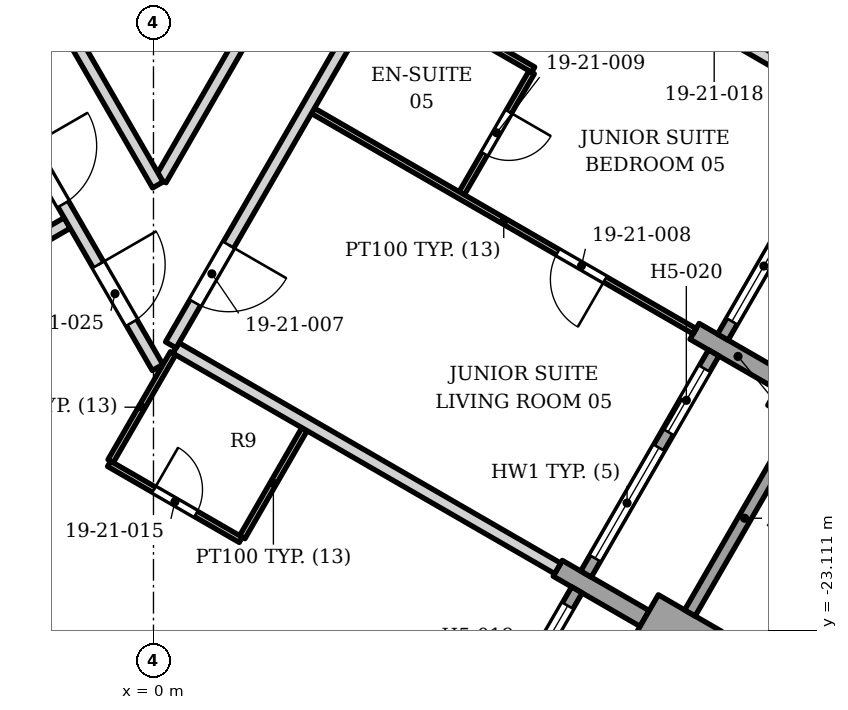
"""IFC4 building model, lengths in metres.
Left out: names, types, materials, properties, quantities, classifications, styles, units other than length and angle.
Written with IfcOpenShell. Run it as: python <this file> out.ifc"""

import sys

from ifc_helpers import new_model, si_unit, direction, frame, frame_2d, origin, origin_2d, place, context, subcontext, project, spatial, rectangle, extrude, element, fill, save


model = new_model("IFC4")
c1 = context("Model", 3, precision=1e-05, world=origin(), true_north=direction((0.0, 1.0)))
c2 = subcontext(c1, "Body", "Model", "MODEL_VIEW")
j1 = project(units=[si_unit("LENGTHUNIT", "METRE"), si_unit("PLANEANGLEUNIT", "RADIAN")], contexts=[c1])
p1 = place(None, origin())
s1 = spatial("IfcSite", under=j1, at=p1, CompositionType="ELEMENT")
p2 = place(p1, origin())
s2 = spatial("IfcBuilding", under=s1, at=p2, CompositionType="ELEMENT")
p3 = place(p2, frame((0.0, 0.0, 91.8)))
s3 = spatial("IfcBuildingStorey", under=s2, at=p3, CompositionType="ELEMENT", Elevation=91.8)
p4 = place(p3, frame((10.847, -19.317, 0.0), z_axis=(0.0, 0.0, 1.0), x_axis=(0.5, 0.866025403784, 0.0)))
e1 = element("IfcColumn", 1, at=p4, inside=s3, PredefinedType="COLUMN", context=c2, shape_type="SweptSolid", body=[
    extrude(rectangle(XDim=0.9, YDim=1.2, at=origin_2d()), origin(), (0.0, 0.0, 1.0), 3.4),
])
p5 = place(p3, frame((9.117, -23.514, 0.0), z_axis=(0.0, 0.0, 1.0), x_axis=(-0.866006032174, 0.500033551112, 0.0)))
e2 = element("IfcWall", 2, at=p5, inside=s3, PredefinedType="SOLIDWALL", context=c2, shape_type="SweptSolid", body=[
    extrude(rectangle(XDim=1.2, YDim=0.9, at=frame_2d((0.6, 0.0))), origin(), (0.0, 0.0, 1.0), 2.63),
])
p6 = place(p3, frame((8.078, -22.914, 0.0), z_axis=(0.0, 0.0, 1.0), x_axis=(-0.866040211805, 0.499974350878, 0.0)))
e3 = element("IfcWall", 3, at=p6, inside=s3, PredefinedType="SOLIDWALL", context=c2, shape_type="SweptSolid", body=[
    extrude(rectangle(XDim=1.65, YDim=0.3, at=frame_2d((0.825, 0.0))), origin(), (0.0, 0.0, 1.0), 2.65),
])
p7 = place(p3, frame((8.899, -18.192, 0.0), z_axis=(0.0, 0.0, 1.0), x_axis=(0.866067297121, -0.499927431592, 0.0)))
e4 = element("IfcWall", 4, at=p7, inside=s3, PredefinedType="SOLIDWALL", context=c2, shape_type="SweptSolid", body=[
    extrude(rectangle(XDim=1.65, YDim=0.3, at=frame_2d((0.825, 0.0))), origin(), (0.0, 0.0, 1.0), 2.65),
])
p8 = place(p3, frame((4.864, -26.081, 0.0), z_axis=(0.0, 0.0, 1.0), x_axis=(0.500027713859, 0.866009402589, 0.0)))
e5 = element("IfcWall", 5, at=p8, inside=s3, PredefinedType="ELEMENTEDWALL", context=c2, shape_type="SweptSolid", body=[
    extrude(rectangle(XDim=4.2, YDim=0.2, at=frame_2d((2.1, 0.0))), origin(), (0.0, 0.0, 1.0), 2.45),
])
p9 = place(p8, frame((0.3, 0.0, 0.6)))
e6 = element("IfcOpeningElement", 6, at=p9, cuts=e5, PredefinedType="OPENING", context=c2, shape_type="SweptSolid", body=[
    extrude(rectangle(XDim=2.1, YDim=1.75, at=frame_2d((1.05, 0.875))), frame((0.0, 0.11, 0.0), z_axis=(0.0, -1.0, 0.0), x_axis=(1.0, 0.0, 0.0)), (0.0, 0.0, 1.0), 0.22),
])
p10 = place(p8, frame((2.7, 0.0, 0.0)))
e7 = element("IfcOpeningElement", 7, at=p10, cuts=e5, PredefinedType="OPENING", context=c2, shape_type="SweptSolid", body=[
    extrude(rectangle(XDim=1.2, YDim=2.35, at=frame_2d((0.6, 1.175))), frame((0.0, 0.11, 0.0), z_axis=(0.0, -1.0, 0.0), x_axis=(1.0, 0.0, 0.0)), (0.0, 0.0, 1.0), 0.22),
])
p11 = place(p3, frame((8.823, -22.824, 0.0), z_axis=(0.0, 0.0, 1.0), x_axis=(0.500012057535, 0.866018442252, 0.0)))
e8 = element("IfcWall", 8, at=p11, inside=s3, PredefinedType="SOLIDWALL", context=c2, shape_type="SweptSolid", body=[
    extrude(rectangle(XDim=3.6, YDim=0.2, at=frame_2d((1.8, 0.0))), origin(), (0.0, 0.0, 1.0), 2.63),
])
p12 = place(p3, frame((7.114, -22.184, 0.0), z_axis=(0.0, 0.0, 1.0), x_axis=(0.500002543286, 0.866023935413, 0.0)))
e9 = element("IfcWall", 9, at=p12, inside=s3, PredefinedType="ELEMENTEDWALL", context=c2, shape_type="SweptSolid", body=[
    extrude(rectangle(XDim=4.2, YDim=0.2, at=frame_2d((2.1, 0.0))), origin(), (0.0, 0.0, 1.0), 2.65),
])
p13 = place(p12, frame((0.3, 0.0, 0.6)))
e10 = element("IfcOpeningElement", 10, at=p13, cuts=e9, PredefinedType="OPENING", context=c2, shape_type="SweptSolid", body=[
    extrude(rectangle(XDim=2.1, YDim=1.8, at=frame_2d((1.05, 0.9))), frame((0.0, 0.11, 0.0), z_axis=(0.0, -1.0, 0.0), x_axis=(1.0, 0.0, 0.0)), (0.0, 0.0, 1.0), 0.22),
])
p14 = place(p12, frame((2.7, 0.0, 0.0)))
e11 = element("IfcOpeningElement", 11, at=p14, cuts=e9, PredefinedType="OPENING", context=c2, shape_type="SweptSolid", body=[
    extrude(rectangle(XDim=1.2, YDim=2.4, at=frame_2d((0.6, 1.2))), frame((0.0, 0.11, 0.0), z_axis=(0.0, -1.0, 0.0), x_axis=(1.0, 0.0, 0.0)), (0.0, 0.0, 1.0), 0.22),
])
p15 = place(p3, frame((9.364, -18.287, 0.0), z_axis=(0.0, 0.0, 1.0), x_axis=(0.500027713859, 0.866009402589, 0.0)))
e12 = element("IfcWall", 12, at=p15, inside=s3, PredefinedType="ELEMENTEDWALL", context=c2, shape_type="SweptSolid", body=[
    extrude(rectangle(XDim=4.2, YDim=0.2, at=frame_2d((2.1, 0.0))), origin(), (0.0, 0.0, 1.0), 2.65),
])
p16 = place(p15, frame((0.3, 0.0, 0.6)))
e13 = element("IfcOpeningElement", 13, at=p16, cuts=e12, PredefinedType="OPENING", context=c2, shape_type="SweptSolid", body=[
    extrude(rectangle(XDim=2.1, YDim=1.8, at=frame_2d((1.05, 0.9))), frame((0.0, 0.11, 0.0), z_axis=(0.0, -1.0, 0.0), x_axis=(1.0, 0.0, 0.0)), (0.0, 0.0, 1.0), 0.22),
])
p17 = place(p15, frame((2.7, 0.0, 0.0)))
e14 = element("IfcOpeningElement", 14, at=p17, cuts=e12, PredefinedType="OPENING", context=c2, shape_type="SweptSolid", body=[
    extrude(rectangle(XDim=1.2, YDim=2.4, at=frame_2d((0.6, 1.2))), frame((0.0, 0.11, 0.0), z_axis=(0.0, -1.0, 0.0), x_axis=(1.0, 0.0, 0.0)), (0.0, 0.0, 1.0), 0.22),
])
p18 = place(p3, frame((1.46, -21.576, 0.0), z_axis=(0.0, 0.0, 1.0), x_axis=(0.499354689006, 0.866397653833, 0.0)))
e15 = element("IfcWall", 15, at=p18, inside=s3, PredefinedType="PARTITIONING", context=c2, shape_type="SweptSolid", body=[
    extrude(rectangle(XDim=2.05, YDim=0.1, at=frame_2d((1.025, 0.0))), origin(), (0.0, 0.0, 1.0), 3.23),
])
p19 = place(p3, frame((-0.729, -20.37, 0.0), z_axis=(0.0, 0.0, 1.0), x_axis=(0.866022959057, -0.500004234368, 0.0)))
e16 = element("IfcWall", 16, at=p19, inside=s3, PredefinedType="PARTITIONING", context=c2, shape_type="SweptSolid", body=[
    extrude(rectangle(XDim=2.5, YDim=0.1, at=frame_2d((1.25, 0.0))), origin(), (0.0, 0.0, 1.0), 2.552),
])
p20 = place(p19, frame((0.85, 0.0, 0.0)))
e17 = element("IfcOpeningElement", 17, at=p20, cuts=e16, PredefinedType="OPENING", context=c2, shape_type="SweptSolid", body=[
    extrude(rectangle(XDim=0.8, YDim=2.1, at=frame_2d((0.4, 1.05))), frame((0.0, 0.06, 0.0), z_axis=(0.0, -1.0, 0.0), x_axis=(1.0, 0.0, 0.0)), (0.0, 0.0, 1.0), 0.12),
])
p21 = place(p3, frame((-5.792, -18.933, 0.0), z_axis=(0.0, 0.0, 1.0), x_axis=(0.866155802953, 0.499774073968, 0.0)))
e18 = element("IfcWall", 18, at=p21, inside=s3, PredefinedType="PARTITIONING", context=c2, shape_type="SweptSolid", body=[
    extrude(rectangle(XDim=5.05, YDim=0.2, at=frame_2d((2.525, 0.0))), origin(), (0.0, 0.0, 1.0), 2.628),
])
p22 = place(p3, frame((-10.334, -0.77, 0.0), z_axis=(0.0, 0.0, 1.0), x_axis=(0.499996405163, -0.866027479255, 0.0)))
e19 = element("IfcWall", 19, at=p22, inside=s3, PredefinedType="PARTITIONING", context=c2, shape_type="SweptSolid", body=[
    extrude(rectangle(XDim=20.803, YDim=0.2, at=frame_2d((10.401, 0.0))), origin(), (0.0, 0.0, 1.0), 2.384),
])
p23 = place(p22, frame((4.0, 0.0, 0.0)))
e20 = element("IfcOpeningElement", 20, at=p23, cuts=e19, PredefinedType="OPENING", context=c2, shape_type="SweptSolid", body=[
    extrude(rectangle(XDim=1.0, YDim=2.1, at=frame_2d((0.5, 1.05))), frame((0.0, 0.11, 0.0), z_axis=(0.0, -1.0, 0.0), x_axis=(1.0, 0.0, 0.0)), (0.0, 0.0, 1.0), 0.22),
])
p24 = place(p22, frame((9.7, 0.0, 0.0)))
e21 = element("IfcOpeningElement", 21, at=p24, cuts=e19, PredefinedType="OPENING", context=c2, shape_type="SweptSolid", body=[
    extrude(rectangle(XDim=1.0, YDim=2.1, at=frame_2d((0.5, 1.05))), frame((0.0, 0.11, 0.0), z_axis=(0.0, -1.0, 0.0), x_axis=(1.0, 0.0, 0.0)), (0.0, 0.0, 1.0), 0.22),
])
p25 = place(p22, frame((16.6, 0.0, 0.0)))
e22 = element("IfcOpeningElement", 22, at=p25, cuts=e19, PredefinedType="OPENING", context=c2, shape_type="SweptSolid", body=[
    extrude(rectangle(XDim=1.1, YDim=2.1, at=frame_2d((0.55, 1.05))), frame((0.0, 0.11, 0.0), z_axis=(0.0, -1.0, 0.0), x_axis=(1.0, 0.0, 0.0)), (0.0, 0.0, 1.0), 0.22),
])
p26 = place(p22, frame((18.852, 0.0, 0.0)))
e23 = element("IfcOpeningElement", 23, at=p26, cuts=e19, PredefinedType="OPENING", context=c2, shape_type="SweptSolid", body=[
    extrude(rectangle(XDim=1.1, YDim=2.1, at=frame_2d((0.55, 1.05))), frame((0.0, 0.11, 0.0), z_axis=(0.0, -1.0, 0.0), x_axis=(1.0, 0.0, 0.0)), (0.0, 0.0, 1.0), 0.22),
])
p27 = place(p3, frame((-0.705, -20.326, 0.0), z_axis=(0.0, 0.0, 1.0), x_axis=(0.500698204548, 0.865621919756, 0.0)))
e24 = element("IfcWall", 24, at=p27, inside=s3, PredefinedType="PARTITIONING", context=c2, shape_type="SweptSolid", body=[
    extrude(rectangle(XDim=2.05, YDim=0.1, at=frame_2d((1.025, 0.0))), origin(), (0.0, 0.0, 1.0), 2.552),
])
p28 = place(p3, frame((0.37, -18.466, 0.0), z_axis=(0.0, 0.0, 1.0), x_axis=(0.866027438349, -0.499996476014, 0.0)))
e25 = element("IfcWall", 25, at=p28, inside=s3, PredefinedType="PARTITIONING", context=c2, shape_type="SweptSolid", body=[
    extrude(rectangle(XDim=7.25, YDim=0.2, at=frame_2d((3.625, 0.0))), origin(), (0.0, 0.0, 1.0), 2.552),
])
p29 = place(p3, frame((5.07, -15.921, 0.0), z_axis=(0.0, 0.0, 1.0), x_axis=(0.500697021662, 0.865622603967, 0.0)))
e26 = element("IfcWall", 26, at=p29, inside=s3, PredefinedType="PARTITIONING", context=c2, shape_type="SweptSolid", body=[
    extrude(rectangle(XDim=2.298, YDim=0.1, at=frame_2d((1.149, 0.0))), origin(), (0.0, 0.0, 1.0), 3.23),
])
p30 = place(p29, frame((0.748, 0.0, 0.0)))
e27 = element("IfcOpeningElement", 27, at=p30, cuts=e26, PredefinedType="OPENING", context=c2, shape_type="SweptSolid", body=[
    extrude(rectangle(XDim=0.8, YDim=2.1, at=frame_2d((0.4, 1.05))), frame((0.0, 0.06, 0.0), z_axis=(0.0, -1.0, 0.0), x_axis=(1.0, 0.0, 0.0)), (0.0, 0.0, 1.0), 0.12),
])
p31 = place(p3, frame((0.119, -15.698, 0.0), z_axis=(0.0, 0.0, 1.0), x_axis=(0.499994537821, 0.866028557352, 0.0)))
e28 = element("IfcWall", 28, at=p31, inside=s3, PredefinedType="PARTITIONING", context=c2, shape_type="SweptSolid", body=[
    extrude(rectangle(XDim=6.524, YDim=0.2, at=frame_2d((3.262, 0.0))), origin(), (0.0, 0.0, 1.0), 2.302),
])
p32 = place(p31, frame((3.413, 0.0, 0.0)))
e29 = element("IfcOpeningElement", 29, at=p32, cuts=e28, PredefinedType="OPENING", context=c2, shape_type="SweptSolid", body=[
    extrude(rectangle(XDim=1.0, YDim=2.1, at=frame_2d((0.5, 1.05))), frame((0.0, 0.11, 0.0), z_axis=(0.0, -1.0, 0.0), x_axis=(1.0, 0.0, 0.0)), (0.0, 0.0, 1.0), 0.22),
])
p33 = place(p3, frame((2.621, -14.565, 0.0), z_axis=(0.0, 0.0, 1.0), x_axis=(0.866035857012, -0.499981894041, 0.0)))
e30 = element("IfcWall", 30, at=p33, inside=s3, PredefinedType="PARTITIONING", context=c2, shape_type="SweptSolid", body=[
    extrude(rectangle(XDim=7.25, YDim=0.1, at=frame_2d((3.625, 0.0))), origin(), (0.0, 0.0, 1.0), 2.552),
])
p34 = place(p33, frame((4.65, 0.0, 0.0)))
e31 = element("IfcOpeningElement", 31, at=p34, cuts=e30, PredefinedType="OPENING", context=c2, shape_type="SweptSolid", body=[
    extrude(rectangle(XDim=0.9, YDim=2.1, at=frame_2d((0.45, 1.05))), frame((0.0, 0.06, 0.0), z_axis=(0.0, -1.0, 0.0), x_axis=(1.0, 0.0, 0.0)), (0.0, 0.0, 1.0), 0.12),
])
p35 = place(p3, frame((3.82, -12.49, 0.0), z_axis=(0.0, 0.0, 1.0), x_axis=(0.866326367614, -0.499478352661, 0.0)))
e32 = element("IfcWall", 32, at=p35, inside=s3, PredefinedType="PARTITIONING", context=c2, shape_type="SweptSolid", body=[
    extrude(rectangle(XDim=2.8, YDim=0.1, at=frame_2d((1.4, 0.0))), origin(), (0.0, 0.0, 1.0), 2.552),
])
p36 = place(p3, frame((8.812, -12.943, 0.0), z_axis=(0.0, 0.0, 1.0), x_axis=(0.86565946566, -0.500633288458, 0.0)))
e33 = element("IfcWall", 33, at=p36, inside=s3, PredefinedType="PARTITIONING", context=c2, shape_type="SweptSolid", body=[
    extrude(rectangle(XDim=2.15, YDim=0.2, at=frame_2d((1.075, 0.0))), origin(), (0.0, 0.0, 1.0), 2.782),
])
p37 = place(p3, frame((0.285, -18.415, 0.0), z_axis=(0.0, 0.0, 1.0), x_axis=(0.5000018851, 0.866024315419, 0.0)))
e34 = element("IfcWall", 34, at=p37, inside=s3, PredefinedType="PARTITIONING", context=c2, shape_type="SweptSolid", body=[
    extrude(rectangle(XDim=9.0, YDim=0.2, at=frame_2d((4.5, 0.0))), origin(), (0.0, 0.0, 1.0), 2.302),
])
p38 = place(p37, frame((0.8, 0.0, 0.0)))
e35 = element("IfcOpeningElement", 35, at=p38, cuts=e34, PredefinedType="OPENING", context=c2, shape_type="SweptSolid", body=[
    extrude(rectangle(XDim=1.1, YDim=2.1, at=frame_2d((0.55, 1.05))), frame((0.0, 0.11, 0.0), z_axis=(0.0, -1.0, 0.0), x_axis=(1.0, 0.0, 0.0)), (0.0, 0.0, 1.0), 0.22),
])
p39 = place(p3, frame((-11.18, 3.7, 0.0), z_axis=(0.0, 0.0, 1.0), x_axis=(0.500129162475, -0.865950818951, 0.0)))
e36 = element("IfcWall", 36, at=p39, inside=s3, PredefinedType="PARTITIONING", context=c2, shape_type="SweptSolid", body=[
    extrude(rectangle(XDim=22.499, YDim=0.2, at=frame_2d((11.249, 0.0))), origin(), (0.0, 0.0, 1.0), 2.384),
])
p40 = place(p39, frame((9.13, 0.0, 0.0)))
e37 = element("IfcOpeningElement", 37, at=p40, cuts=e36, PredefinedType="OPENING", context=c2, shape_type="SweptSolid", body=[
    extrude(rectangle(XDim=1.0, YDim=2.1, at=frame_2d((0.5, 1.05))), frame((0.0, 0.11, 0.0), z_axis=(0.0, -1.0, 0.0), x_axis=(1.0, 0.0, 0.0)), (0.0, 0.0, 1.0), 0.22),
])
p41 = place(p39, frame((15.111, 0.0, 0.0)))
e38 = element("IfcOpeningElement", 38, at=p41, cuts=e36, PredefinedType="OPENING", context=c2, shape_type="SweptSolid", body=[
    extrude(rectangle(XDim=1.0, YDim=2.1, at=frame_2d((0.5, 1.05))), frame((0.0, 0.11, 0.0), z_axis=(0.0, -1.0, 0.0), x_axis=(1.0, 0.0, 0.0)), (0.0, 0.0, 1.0), 0.22),
])
p42 = place(p39, frame((5.834, 0.0, 0.0)))
e39 = element("IfcOpeningElement", 39, at=p42, cuts=e36, PredefinedType="OPENING", context=c2, shape_type="SweptSolid", body=[
    extrude(rectangle(XDim=1.0, YDim=2.1, at=frame_2d((0.5, 1.05))), frame((0.0, 0.11, 0.0), z_axis=(0.0, -1.0, 0.0), x_axis=(1.0, 0.0, 0.0)), (0.0, 0.0, 1.0), 0.22),
])
p43 = place(p10, origin())
e40 = element("IfcDoor", 40, at=p43, inside=s3, OperationType="SINGLE_SWING_LEFT", PredefinedType="DOOR", context=c2, shape_type="SweptSolid", body=[
    extrude(rectangle(XDim=1.2, YDim=2.35, at=frame_2d((0.6, 1.175))), frame((0.0, 0.025, 0.0), z_axis=(0.0, -1.0, 0.0), x_axis=(1.0, 0.0, 0.0)), (0.0, 0.0, 1.0), 0.05),
])
fill(e7, e40)
p44 = place(p13, origin())
e41 = element("IfcWindow", 41, at=p44, inside=s3, PartitioningType="SINGLE_PANEL", PredefinedType="WINDOW", context=c2, shape_type="SweptSolid", body=[
    extrude(rectangle(XDim=2.1, YDim=1.8, at=frame_2d((1.05, 0.9))), frame((0.0, 0.03, 0.0), z_axis=(0.0, -1.0, 0.0), x_axis=(1.0, 0.0, 0.0)), (0.0, 0.0, 1.0), 0.06),
])
fill(e10, e41)
p45 = place(p14, origin())
e42 = element("IfcDoor", 42, at=p45, inside=s3, OperationType="SINGLE_SWING_LEFT", PredefinedType="DOOR", context=c2, shape_type="SweptSolid", body=[
    extrude(rectangle(XDim=1.2, YDim=2.4, at=frame_2d((0.6, 1.2))), frame((0.0, 0.025, 0.0), z_axis=(0.0, -1.0, 0.0), x_axis=(1.0, 0.0, 0.0)), (0.0, 0.0, 1.0), 0.05),
])
fill(e11, e42)
p46 = place(p16, origin())
e43 = element("IfcWindow", 43, at=p46, inside=s3, PartitioningType="SINGLE_PANEL", PredefinedType="WINDOW", context=c2, shape_type="SweptSolid", body=[
    extrude(rectangle(XDim=2.1, YDim=1.8, at=frame_2d((1.05, 0.9))), frame((0.0, 0.03, 0.0), z_axis=(0.0, -1.0, 0.0), x_axis=(1.0, 0.0, 0.0)), (0.0, 0.0, 1.0), 0.06),
])
fill(e13, e43)
p47 = place(p25, origin())
e44 = element("IfcDoor", 44, at=p47, inside=s3, OperationType="SINGLE_SWING_LEFT", PredefinedType="DOOR", context=c2, shape_type="SweptSolid", body=[
    extrude(rectangle(XDim=1.1, YDim=2.1, at=frame_2d((0.55, 1.05))), frame((0.0, 0.025, 0.0), z_axis=(0.0, -1.0, 0.0), x_axis=(1.0, 0.0, 0.0)), (0.0, 0.0, 1.0), 0.05),
])
fill(e22, e44)
p48 = place(p38, origin())
e45 = element("IfcDoor", 45, at=p48, inside=s3, OperationType="SINGLE_SWING_RIGHT", PredefinedType="DOOR", context=c2, shape_type="SweptSolid", body=[
    extrude(rectangle(XDim=1.1, YDim=2.1, at=frame_2d((0.55, 1.05))), frame((0.0, 0.025, 0.0), z_axis=(0.0, -1.0, 0.0), x_axis=(1.0, 0.0, 0.0)), (0.0, 0.0, 1.0), 0.05),
])
fill(e35, e45)
p49 = place(p34, origin())
e46 = element("IfcDoor", 46, at=p49, inside=s3, OperationType="SINGLE_SWING_RIGHT", PredefinedType="DOOR", context=c2, shape_type="SweptSolid", body=[
    extrude(rectangle(XDim=0.9, YDim=2.1, at=frame_2d((0.45, 1.05))), frame((0.0, 0.025, 0.0), z_axis=(0.0, -1.0, 0.0), x_axis=(1.0, 0.0, 0.0)), (0.0, 0.0, 1.0), 0.05),
])
fill(e31, e46)
p50 = place(p30, origin())
e47 = element("IfcDoor", 47, at=p50, inside=s3, OperationType="SINGLE_SWING_RIGHT", PredefinedType="DOOR", context=c2, shape_type="SweptSolid", body=[
    extrude(rectangle(XDim=0.8, YDim=2.1, at=frame_2d((0.4, 1.05))), frame((0.0, 0.025, 0.0), z_axis=(0.0, -1.0, 0.0), x_axis=(1.0, 0.0, 0.0)), (0.0, 0.0, 1.0), 0.05),
])
fill(e27, e47)
p51 = place(p20, origin())
e48 = element("IfcDoor", 48, at=p51, inside=s3, OperationType="SINGLE_SWING_LEFT", PredefinedType="DOOR", context=c2, shape_type="SweptSolid", body=[
    extrude(rectangle(XDim=0.8, YDim=2.1, at=frame_2d((0.4, 1.05))), frame((0.0, 0.025, 0.0), z_axis=(0.0, -1.0, 0.0), x_axis=(1.0, 0.0, 0.0)), (0.0, 0.0, 1.0), 0.05),
])
fill(e17, e48)
p52 = place(p26, origin())
e49 = element("IfcDoor", 49, at=p52, inside=s3, OperationType="SINGLE_SWING_LEFT", PredefinedType="DOOR", context=c2, shape_type="SweptSolid", body=[
    extrude(rectangle(XDim=1.1, YDim=2.1, at=frame_2d((0.55, 1.05))), frame((0.0, 0.025, 0.0), z_axis=(0.0, -1.0, 0.0), x_axis=(1.0, 0.0, 0.0)), (0.0, 0.0, 1.0), 0.05),
])
fill(e23, e49)
save(model, sys.argv[1])
